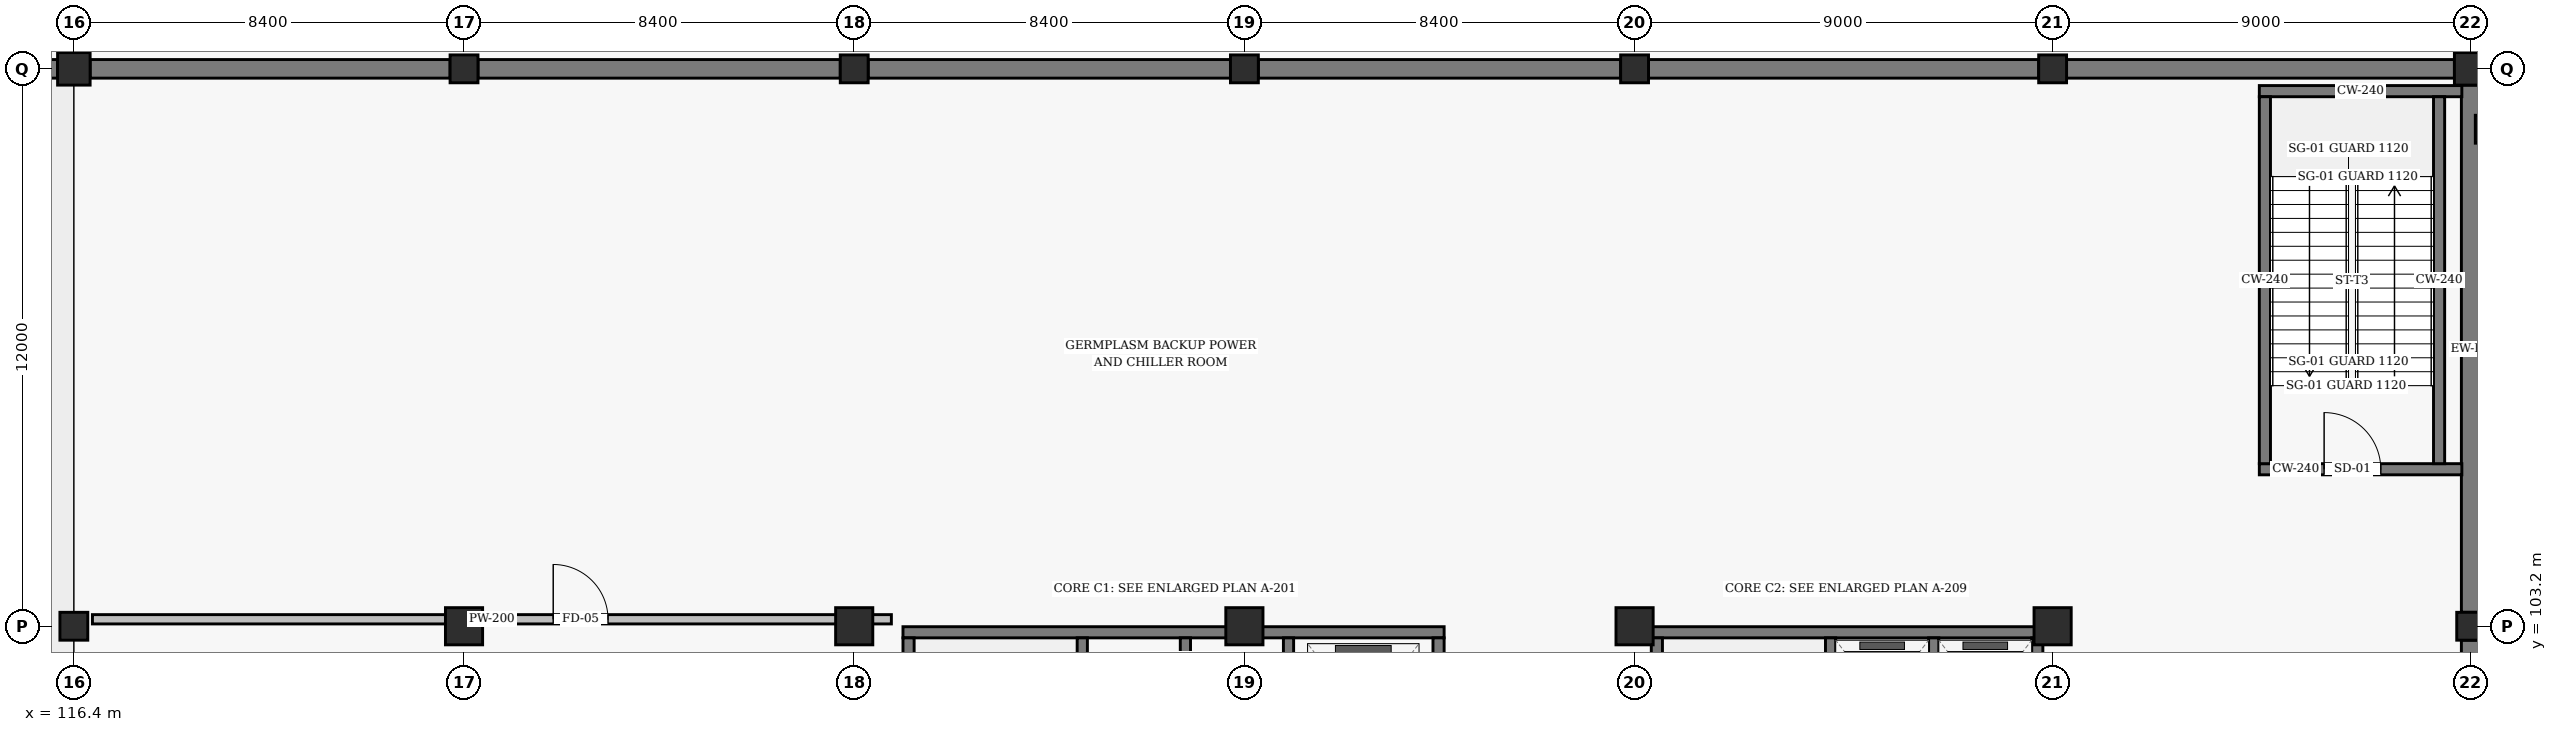
"""IFC4 building model, lengths in metres.
Left out: names, types, materials, properties, quantities, classifications, styles, units other than length and angle.
Written with IfcOpenShell. Run it as: python <this file> out.ifc"""

import sys

from ifc_helpers import new_model, si_unit, direction, frame, frame_2d, origin, origin_2d, place, context, subcontext, project, spatial, rectangle, hollow_rectangle, extrude, element, fill, save


model = new_model("IFC4")
c1 = context("Model", 3, precision=1e-05, world=origin(), true_north=direction((0.0, 1.0)))
c2 = subcontext(c1, "Body", "Model", "MODEL_VIEW")
j1 = project(units=[si_unit("LENGTHUNIT", "METRE"), si_unit("PLANEANGLEUNIT", "RADIAN")], contexts=[c1])
p1 = place(None, origin())
s1 = spatial("IfcSite", under=j1, at=p1, CompositionType="ELEMENT")
p2 = place(p1, origin())
s2 = spatial("IfcBuilding", under=s1, at=p2, CompositionType="ELEMENT")
p3 = place(p2, frame((0.0, 0.0, -4.8)))
s3 = spatial("IfcBuildingStorey", under=s2, at=p3, CompositionType="ELEMENT", Elevation=-4.8)
p4 = place(p3, frame((116.4, 103.2, 0.0), z_axis=(0.0, 0.0, 1.0), x_axis=(1.0, 0.0, 0.0)))
e1 = element("IfcColumn", 1, at=p4, inside=s3, PredefinedType="COLUMN", context=c2, shape_type="SweptSolid", body=[
    extrude(hollow_rectangle(XDim=0.6, YDim=0.6, WallThickness=0.025, InnerFilletRadius=0.025, OuterFilletRadius=0.05, at=origin_2d()), origin(), (0.0, 0.0, 1.0), 4.8),
])
p5 = place(p3, frame((116.4, 115.2, 0.0), z_axis=(0.0, 0.0, 1.0), x_axis=(1.0, 0.0, 0.0)))
e2 = element("IfcColumn", 2, at=p5, inside=s3, PredefinedType="COLUMN", context=c2, shape_type="SweptSolid", body=[
    extrude(hollow_rectangle(XDim=0.7, YDim=0.7, WallThickness=0.032, InnerFilletRadius=0.032, OuterFilletRadius=0.064, at=origin_2d()), origin(), (0.0, 0.0, 1.0), 4.8),
])
p6 = place(p3, frame((124.8, 103.2, 0.0), z_axis=(0.0, 0.0, 1.0), x_axis=(1.0, 0.0, 0.0)))
e3 = element("IfcColumn", 3, at=p6, inside=s3, PredefinedType="COLUMN", context=c2, shape_type="SweptSolid", body=[
    extrude(rectangle(XDim=0.8, YDim=0.8, at=origin_2d()), origin(), (0.0, 0.0, 1.0), 4.8),
])
p7 = place(p3, frame((124.8, 115.2, 0.0), z_axis=(0.0, 0.0, 1.0), x_axis=(1.0, 0.0, 0.0)))
e4 = element("IfcColumn", 4, at=p7, inside=s3, PredefinedType="COLUMN", context=c2, shape_type="SweptSolid", body=[
    extrude(hollow_rectangle(XDim=0.6, YDim=0.6, WallThickness=0.025, InnerFilletRadius=0.025, OuterFilletRadius=0.05, at=origin_2d()), origin(), (0.0, 0.0, 1.0), 4.8),
])
p8 = place(p3, frame((133.2, 103.2, 0.0), z_axis=(0.0, 0.0, 1.0), x_axis=(1.0, 0.0, 0.0)))
e5 = element("IfcColumn", 5, at=p8, inside=s3, PredefinedType="COLUMN", context=c2, shape_type="SweptSolid", body=[
    extrude(rectangle(XDim=0.8, YDim=0.8, at=origin_2d()), origin(), (0.0, 0.0, 1.0), 4.8),
])
p9 = place(p3, frame((133.2, 115.2, 0.0), z_axis=(0.0, 0.0, 1.0), x_axis=(1.0, 0.0, 0.0)))
e6 = element("IfcColumn", 6, at=p9, inside=s3, PredefinedType="COLUMN", context=c2, shape_type="SweptSolid", body=[
    extrude(hollow_rectangle(XDim=0.6, YDim=0.6, WallThickness=0.025, InnerFilletRadius=0.025, OuterFilletRadius=0.05, at=origin_2d()), origin(), (0.0, 0.0, 1.0), 4.8),
])
p10 = place(p3, frame((141.6, 103.2, 0.0), z_axis=(0.0, 0.0, 1.0), x_axis=(1.0, 0.0, 0.0)))
e7 = element("IfcColumn", 7, at=p10, inside=s3, PredefinedType="COLUMN", context=c2, shape_type="SweptSolid", body=[
    extrude(rectangle(XDim=0.8, YDim=0.8, at=origin_2d()), origin(), (0.0, 0.0, 1.0), 4.8),
])
p11 = place(p3, frame((141.6, 115.2, 0.0), z_axis=(0.0, 0.0, 1.0), x_axis=(1.0, 0.0, 0.0)))
e8 = element("IfcColumn", 8, at=p11, inside=s3, PredefinedType="COLUMN", context=c2, shape_type="SweptSolid", body=[
    extrude(hollow_rectangle(XDim=0.6, YDim=0.6, WallThickness=0.025, InnerFilletRadius=0.025, OuterFilletRadius=0.05, at=origin_2d()), origin(), (0.0, 0.0, 1.0), 4.8),
])
p12 = place(p3, frame((150.0, 103.2, 0.0), z_axis=(0.0, 0.0, 1.0), x_axis=(1.0, 0.0, 0.0)))
e9 = element("IfcColumn", 9, at=p12, inside=s3, PredefinedType="COLUMN", context=c2, shape_type="SweptSolid", body=[
    extrude(rectangle(XDim=0.8, YDim=0.8, at=origin_2d()), origin(), (0.0, 0.0, 1.0), 4.8),
])
p13 = place(p3, frame((150.0, 115.2, 0.0), z_axis=(0.0, 0.0, 1.0), x_axis=(1.0, 0.0, 0.0)))
e10 = element("IfcColumn", 10, at=p13, inside=s3, PredefinedType="COLUMN", context=c2, shape_type="SweptSolid", body=[
    extrude(hollow_rectangle(XDim=0.6, YDim=0.6, WallThickness=0.025, InnerFilletRadius=0.025, OuterFilletRadius=0.05, at=origin_2d()), origin(), (0.0, 0.0, 1.0), 4.8),
])
p14 = place(p3, frame((159.0, 103.2, 0.0), z_axis=(0.0, 0.0, 1.0), x_axis=(1.0, 0.0, 0.0)))
e11 = element("IfcColumn", 11, at=p14, inside=s3, PredefinedType="COLUMN", context=c2, shape_type="SweptSolid", body=[
    extrude(rectangle(XDim=0.8, YDim=0.8, at=origin_2d()), origin(), (0.0, 0.0, 1.0), 4.8),
])
for number, where, z_axis, x_axis in (
    (12, (159.0, 115.2, 0.0), (0.0, 0.0, 1.0), (1.0, 0.0, 0.0)),
    (13, (168.0, 103.2, 0.0), (0.0, 0.0, 1.0), (1.0, 0.0, 0.0)),
):
    element("IfcColumn", number, at=place(p3, frame(where, z_axis=z_axis, x_axis=x_axis)), inside=s3, PredefinedType="COLUMN", context=c2, shape_type="SweptSolid", body=[
        extrude(hollow_rectangle(XDim=0.6, YDim=0.6, WallThickness=0.025, InnerFilletRadius=0.025, OuterFilletRadius=0.05, at=origin_2d()), origin(), (0.0, 0.0, 1.0), 4.8),
    ])
p15 = place(p3, frame((168.0, 115.2, 0.0), z_axis=(0.0, 0.0, 1.0), x_axis=(1.0, 0.0, 0.0)))
e14 = element("IfcColumn", 14, at=p15, inside=s3, PredefinedType="COLUMN", context=c2, shape_type="SweptSolid", body=[
    extrude(hollow_rectangle(XDim=0.7, YDim=0.7, WallThickness=0.032, InnerFilletRadius=0.032, OuterFilletRadius=0.064, at=origin_2d()), origin(), (0.0, 0.0, 1.0), 4.8),
])
p16 = place(p3, frame((168.4, 113.9, 0.0), z_axis=(0.0, 0.0, 1.0), x_axis=(1.0, 0.0, 0.0)))
e15 = element("IfcColumn", 15, at=p16, inside=s3, PredefinedType="COLUMN", context=c2, shape_type="SweptSolid", body=[
    extrude(rectangle(XDim=0.6, YDim=0.6, at=origin_2d()), origin(), (0.0, 0.0, 1.0), 4.56),
])
p17 = place(p3, frame((168.0, 95.1, 0.0), z_axis=(0.0, 0.0, 1.0), x_axis=(0.0, 1.0, 0.0)))
e16 = element("IfcWall", 16, at=p17, inside=s3, PredefinedType="SOLIDWALL", context=c2, shape_type="SweptSolid", body=[
    extrude(rectangle(XDim=7.8, YDim=0.4, at=frame_2d((3.9, 0.0))), origin(), (0.0, 0.0, 1.0), 3.84),
])
p18 = place(p3, frame((168.0, 103.5, 0.0), z_axis=(0.0, 0.0, 1.0), x_axis=(0.0, 1.0, 0.0)))
e17 = element("IfcWall", 17, at=p18, inside=s3, PredefinedType="SOLIDWALL", context=c2, shape_type="SweptSolid", body=[
    extrude(rectangle(XDim=11.35, YDim=0.4, at=frame_2d((5.675, 0.0))), origin(), (0.0, 0.0, 1.0), 3.84),
])
p19 = place(p3, frame((167.65, 115.2, 0.0), z_axis=(0.0, 0.0, 1.0), x_axis=(-1.0, 0.0, 0.0)))
e18 = element("IfcWall", 18, at=p19, inside=s3, PredefinedType="SOLIDWALL", context=c2, shape_type="SweptSolid", body=[
    extrude(rectangle(XDim=8.35, YDim=0.4, at=frame_2d((4.175, 0.0))), origin(), (0.0, 0.0, 1.0), 3.89),
])
p20 = place(p3, frame((158.7, 115.2, 0.0), z_axis=(0.0, 0.0, 1.0), x_axis=(-1.0, 0.0, 0.0)))
e19 = element("IfcWall", 19, at=p20, inside=s3, PredefinedType="SOLIDWALL", context=c2, shape_type="SweptSolid", body=[
    extrude(rectangle(XDim=8.4, YDim=0.4, at=frame_2d((4.2, 0.0))), origin(), (0.0, 0.0, 1.0), 3.89),
])
for number, where, z_axis, x_axis in (
    (20, (149.7, 115.2, 0.0), (0.0, 0.0, 1.0), (-1.0, 0.0, 0.0)),
    (21, (141.3, 115.2, 0.0), (0.0, 0.0, 1.0), (-1.0, 0.0, 0.0)),
):
    element("IfcWall", number, at=place(p3, frame(where, z_axis=z_axis, x_axis=x_axis)), inside=s3, PredefinedType="SOLIDWALL", context=c2, shape_type="SweptSolid", body=[
        extrude(rectangle(XDim=7.8, YDim=0.4, at=frame_2d((3.9, 0.0))), origin(), (0.0, 0.0, 1.0), 3.79),
    ])
p21 = place(p3, frame((132.9, 115.2, 0.0), z_axis=(0.0, 0.0, 1.0), x_axis=(-1.0, 0.0, 0.0)))
e22 = element("IfcWall", 22, at=p21, inside=s3, PredefinedType="SOLIDWALL", context=c2, shape_type="SweptSolid", body=[
    extrude(rectangle(XDim=7.8, YDim=0.4, at=frame_2d((3.9, 0.0))), origin(), (0.0, 0.0, 1.0), 3.79),
])
p22 = place(p3, frame((124.5, 115.2, 0.0), z_axis=(0.0, 0.0, 1.0), x_axis=(-1.0, 0.0, 0.0)))
e23 = element("IfcWall", 23, at=p22, inside=s3, PredefinedType="SOLIDWALL", context=c2, shape_type="SweptSolid", body=[
    extrude(rectangle(XDim=7.75, YDim=0.4, at=frame_2d((3.875, 0.0))), origin(), (0.0, 0.0, 1.0), 3.79),
])
p23 = place(p3, frame((116.05, 115.2, 0.0), z_axis=(0.0, 0.0, 1.0), x_axis=(-1.0, 0.0, 0.0)))
e24 = element("IfcWall", 24, at=p23, inside=s3, PredefinedType="SOLIDWALL", context=c2, shape_type="SweptSolid", body=[
    extrude(rectangle(XDim=7.9, YDim=0.4, at=frame_2d((3.95, 0.0))), origin(), (0.0, 0.0, 1.0), 3.79),
])
p24 = place(p3, frame((134.25, 103.07, 0.0), z_axis=(0.0, 0.0, 1.0), x_axis=(1.0, 0.0, 0.0)))
e25 = element("IfcWall", 25, at=p24, inside=s3, PredefinedType="SHEAR", context=c2, shape_type="SweptSolid", body=[
    extrude(rectangle(XDim=11.65, YDim=0.24, at=frame_2d((5.825, 0.0))), origin(), (0.0, 0.0, 1.0), 4.54),
])
p25 = place(p3, frame((134.37, 95.05, 0.0), z_axis=(0.0, 0.0, 1.0), x_axis=(0.0, 1.0, 0.0)))
e26 = element("IfcWall", 26, at=p25, inside=s3, PredefinedType="SHEAR", context=c2, shape_type="SweptSolid", body=[
    extrude(rectangle(XDim=7.9, YDim=0.24, at=frame_2d((3.95, 0.0))), origin(), (0.0, 0.0, 1.0), 4.54),
])
p26 = place(p3, frame((138.11, 95.05, 0.0), z_axis=(0.0, 0.0, 1.0), x_axis=(0.0, 1.0, 0.0)))
e27 = element("IfcWall", 27, at=p26, inside=s3, PredefinedType="SHEAR", context=c2, shape_type="SweptSolid", body=[
    extrude(rectangle(XDim=7.9, YDim=0.22, at=frame_2d((3.95, 0.0))), origin(), (0.0, 0.0, 1.0), 4.54),
])
p27 = place(p3, frame((140.33, 98.54, 0.0), z_axis=(0.0, 0.0, 1.0), x_axis=(0.0, 1.0, 0.0)))
e28 = element("IfcWall", 28, at=p27, inside=s3, PredefinedType="SHEAR", context=c2, shape_type="SweptSolid", body=[
    extrude(rectangle(XDim=4.41, YDim=0.22, at=frame_2d((2.205, 0.0))), origin(), (0.0, 0.0, 1.0), 4.54),
])
p28 = place(p3, frame((142.55, 95.05, 0.0), z_axis=(0.0, 0.0, 1.0), x_axis=(0.0, 1.0, 0.0)))
e29 = element("IfcWall", 29, at=p28, inside=s3, PredefinedType="SHEAR", context=c2, shape_type="SweptSolid", body=[
    extrude(rectangle(XDim=7.9, YDim=0.22, at=frame_2d((3.95, 0.0))), origin(), (0.0, 0.0, 1.0), 4.54),
])
p29 = place(p3, frame((145.78, 95.05, 0.0), z_axis=(0.0, 0.0, 1.0), x_axis=(0.0, 1.0, 0.0)))
e30 = element("IfcWall", 30, at=p29, inside=s3, PredefinedType="SHEAR", context=c2, shape_type="SweptSolid", body=[
    extrude(rectangle(XDim=7.9, YDim=0.24, at=frame_2d((3.95, 0.0))), origin(), (0.0, 0.0, 1.0), 4.54),
])
p30 = place(p3, frame((150.02, 103.07, 0.0), z_axis=(0.0, 0.0, 1.0), x_axis=(1.0, 0.0, 0.0)))
e31 = element("IfcWall", 31, at=p30, inside=s3, PredefinedType="SHEAR", context=c2, shape_type="SweptSolid", body=[
    extrude(rectangle(XDim=8.77, YDim=0.24, at=frame_2d((4.385, 0.0))), origin(), (0.0, 0.0, 1.0), 4.54),
])
p31 = place(p3, frame((150.48, 95.05, 0.0), z_axis=(0.0, 0.0, 1.0), x_axis=(0.0, 1.0, 0.0)))
e32 = element("IfcWall", 32, at=p31, inside=s3, PredefinedType="SHEAR", context=c2, shape_type="SweptSolid", body=[
    extrude(rectangle(XDim=7.9, YDim=0.24, at=frame_2d((3.95, 0.0))), origin(), (0.0, 0.0, 1.0), 4.54),
])
p32 = place(p3, frame((154.22, 95.05, 0.0), z_axis=(0.0, 0.0, 1.0), x_axis=(0.0, 1.0, 0.0)))
e33 = element("IfcWall", 33, at=p32, inside=s3, PredefinedType="SHEAR", context=c2, shape_type="SweptSolid", body=[
    extrude(rectangle(XDim=7.9, YDim=0.22, at=frame_2d((3.95, 0.0))), origin(), (0.0, 0.0, 1.0), 4.54),
])
p33 = place(p3, frame((158.67, 95.05, 0.0), z_axis=(0.0, 0.0, 1.0), x_axis=(0.0, 1.0, 0.0)))
e34 = element("IfcWall", 34, at=p33, inside=s3, PredefinedType="SHEAR", context=c2, shape_type="SweptSolid", body=[
    extrude(rectangle(XDim=7.9, YDim=0.24, at=frame_2d((3.95, 0.0))), origin(), (0.0, 0.0, 1.0), 4.54),
])
p34 = place(p33, frame((3.05, 0.0, 0.0)))
e35 = element("IfcOpeningElement", 35, at=p34, cuts=e34, PredefinedType="OPENING", context=c2, shape_type="SweptSolid", body=[
    extrude(rectangle(XDim=1.48, YDim=2.22, at=frame_2d((0.74, 1.11))), frame((0.0, 0.13, 0.0), z_axis=(0.0, -1.0, 0.0), x_axis=(1.0, 0.0, 0.0)), (0.0, 0.0, 1.0), 0.26),
])
p35 = place(p3, frame((156.44, 100.25, 0.0), z_axis=(0.0, 0.0, 1.0), x_axis=(0.0, 1.0, 0.0)))
e36 = element("IfcWall", 36, at=p35, inside=s3, PredefinedType="SHEAR", context=c2, shape_type="SweptSolid", body=[
    extrude(rectangle(XDim=2.7, YDim=0.22, at=frame_2d((1.35, 0.0))), origin(), (0.0, 0.0, 1.0), 4.54),
])
p36 = place(p3, frame((163.45, 106.58, 0.0), z_axis=(0.0, 0.0, 1.0), x_axis=(1.0, 0.0, 0.0)))
e37 = element("IfcWall", 37, at=p36, inside=s3, PredefinedType="SHEAR", context=c2, shape_type="SweptSolid", body=[
    extrude(rectangle(XDim=4.36, YDim=0.24, at=frame_2d((2.18, 0.0))), origin(), (0.0, 0.0, 1.0), 4.54),
])
p37 = place(p36, frame((1.395, 0.0, 0.0)))
e38 = element("IfcOpeningElement", 38, at=p37, cuts=e37, PredefinedType="OPENING", context=c2, shape_type="SweptSolid", body=[
    extrude(rectangle(XDim=1.22, YDim=2.18, at=frame_2d((0.61, 1.09))), frame((0.0, 0.13, 0.0), z_axis=(0.0, -1.0, 0.0), x_axis=(1.0, 0.0, 0.0)), (0.0, 0.0, 1.0), 0.26),
])
p38 = place(p3, frame((163.45, 114.72, 0.0), z_axis=(0.0, 0.0, 1.0), x_axis=(1.0, 0.0, 0.0)))
e39 = element("IfcWall", 39, at=p38, inside=s3, PredefinedType="SHEAR", context=c2, shape_type="SweptSolid", body=[
    extrude(rectangle(XDim=4.36, YDim=0.24, at=frame_2d((2.18, 0.0))), origin(), (0.0, 0.0, 1.0), 4.54),
])
for number, where, z_axis, x_axis in (
    (40, (163.57, 106.7, 0.0), (0.0, 0.0, 1.0), (0.0, 1.0, 0.0)),
    (41, (167.32, 106.7, 0.0), (0.0, 0.0, 1.0), (0.0, 1.0, 0.0)),
):
    element("IfcWall", number, at=place(p3, frame(where, z_axis=z_axis, x_axis=x_axis)), inside=s3, PredefinedType="SHEAR", context=c2, shape_type="SweptSolid", body=[
        extrude(rectangle(XDim=7.9, YDim=0.24, at=frame_2d((3.95, 0.0))), origin(), (0.0, 0.0, 1.0), 4.54),
    ])
p39 = place(p3, frame((116.8, 103.35, 0.0), z_axis=(0.0, 0.0, 1.0), x_axis=(1.0, 0.0, 0.0)))
e42 = element("IfcWall", 42, at=p39, inside=s3, PredefinedType="SOLIDWALL", context=c2, shape_type="SweptSolid", body=[
    extrude(rectangle(XDim=17.2, YDim=0.2, at=frame_2d((8.6, 0.0))), origin(), (0.0, 0.0, 1.0), 3.79),
])
p40 = place(p39, frame((9.92, 0.0, 0.0)))
e43 = element("IfcOpeningElement", 43, at=p40, cuts=e42, PredefinedType="OPENING", context=c2, shape_type="SweptSolid", body=[
    extrude(rectangle(XDim=1.18, YDim=2.15, at=frame_2d((0.59, 1.075))), frame((0.0, 0.11, 0.0), z_axis=(0.0, -1.0, 0.0), x_axis=(1.0, 0.0, 0.0)), (0.0, 0.0, 1.0), 0.22),
])
p41 = place(p37, origin())
e44 = element("IfcDoor", 44, at=p41, inside=s3, OperationType="SINGLE_SWING_LEFT", PredefinedType="DOOR", context=c2, shape_type="SweptSolid", body=[
    extrude(rectangle(XDim=1.22, YDim=2.18, at=frame_2d((0.61, 1.09))), frame((0.0, 0.025, 0.0), z_axis=(0.0, -1.0, 0.0), x_axis=(1.0, 0.0, 0.0)), (0.0, 0.0, 1.0), 0.05),
])
fill(e38, e44)
p42 = place(p40, origin())
e45 = element("IfcDoor", 45, at=p42, inside=s3, OperationType="SINGLE_SWING_LEFT", PredefinedType="DOOR", context=c2, shape_type="SweptSolid", body=[
    extrude(rectangle(XDim=1.18, YDim=2.15, at=frame_2d((0.59, 1.075))), frame((0.0, 0.025, 0.0), z_axis=(0.0, -1.0, 0.0), x_axis=(1.0, 0.0, 0.0)), (0.0, 0.0, 1.0), 0.05),
])
fill(e43, e45)
save(model, sys.argv[1])
